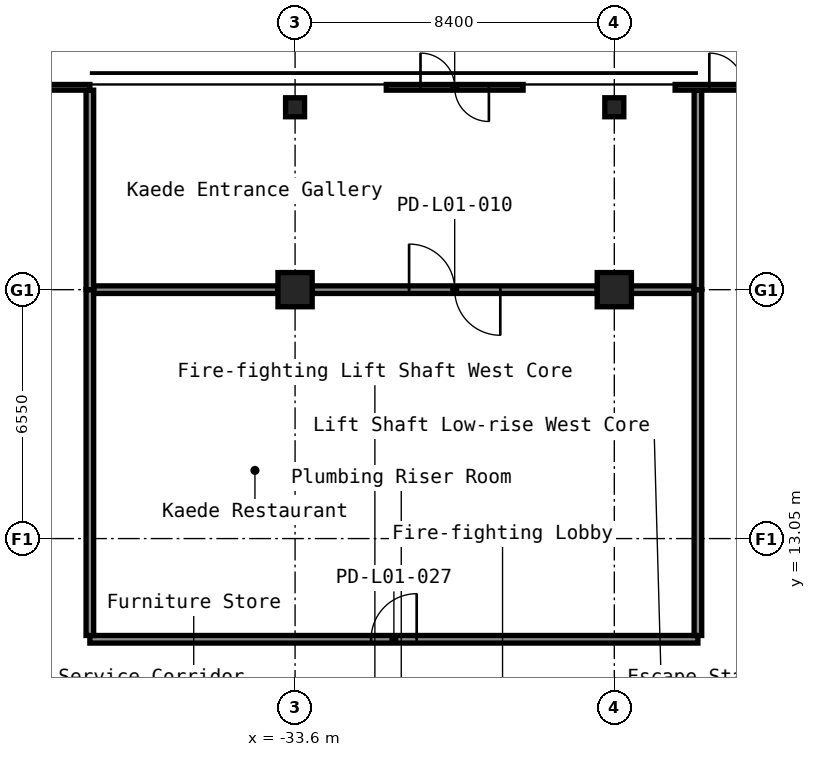
"""IFC4 building model, lengths in metres.
Left out: names, types, materials, properties, quantities, classifications, styles, units other than length and angle.
Written with IfcOpenShell. Run it as: python <this file> out.ifc"""

import sys

from ifc_helpers import new_model, si_unit, direction, frame, frame_2d, origin, origin_2d, place, context, subcontext, project, spatial, rectangle, hollow_rectangle, extrude, element, fill, save


model = new_model("IFC4")
c1 = context("Model", 3, precision=1e-05, world=origin(), true_north=direction((0.0, 1.0)))
c2 = subcontext(c1, "Body", "Model", "MODEL_VIEW")
j1 = project(units=[si_unit("LENGTHUNIT", "METRE"), si_unit("PLANEANGLEUNIT", "RADIAN")], contexts=[c1])
p1 = place(None, origin())
s1 = spatial("IfcSite", under=j1, at=p1, CompositionType="ELEMENT")
p2 = place(p1, origin())
s2 = spatial("IfcBuilding", under=s1, at=p2, CompositionType="ELEMENT")
p3 = place(p2, origin())
s3 = spatial("IfcBuildingStorey", under=s2, at=p3, CompositionType="ELEMENT", Elevation=0.0)
for number, where, z_axis, x_axis in (
    (1, (-33.6, 19.6, -0.3), (0.0, 0.0, 1.0), (1.0, 0.0, 0.0)),
    (2, (-25.2, 19.6, -0.3), (0.0, 0.0, 1.0), (1.0, 0.0, 0.0)),
):
    element("IfcColumn", number, at=place(p3, frame(where, z_axis=z_axis, x_axis=x_axis)), inside=s3, PredefinedType="COLUMN", context=c2, shape_type="SweptSolid", body=[
        extrude(hollow_rectangle(XDim=0.9, YDim=0.9, WallThickness=0.036, at=origin_2d()), origin(), (0.0, 0.0, 1.0), 8.9),
    ])
for number, where, z_axis, x_axis in (
    (3, (-33.6, 24.4, -0.3), (0.0, 0.0, 1.0), (1.0, 0.0, 0.0)),
    (4, (-25.2, 24.4, -0.3), (0.0, 0.0, 1.0), (1.0, 0.0, 0.0)),
):
    element("IfcColumn", number, at=place(p3, frame(where, z_axis=z_axis, x_axis=x_axis)), inside=s3, PredefinedType="COLUMN", context=c2, shape_type="SweptSolid", body=[
        extrude(hollow_rectangle(XDim=0.5, YDim=0.5, WallThickness=0.019, InnerFilletRadius=0.029, OuterFilletRadius=0.048, at=origin_2d()), origin(), (0.0, 0.0, 1.0), 8.9),
    ])
p4 = place(p3, frame((-38.9, 19.6, 0.0), z_axis=(0.0, 0.0, 1.0), x_axis=(1.0, 0.0, 0.0)))
e5 = element("IfcWall", 5, at=p4, inside=s3, PredefinedType="PARTITIONING", context=c2, shape_type="SweptSolid", body=[
    extrude(rectangle(XDim=4.85, YDim=0.2, at=frame_2d((2.425, 0.0))), origin(), (0.0, 0.0, 1.0), 8.6),
])
p5 = place(p3, frame((-33.15, 19.6, 0.0), z_axis=(0.0, 0.0, 1.0), x_axis=(1.0, 0.0, 0.0)))
e6 = element("IfcWall", 6, at=p5, inside=s3, PredefinedType="PARTITIONING", context=c2, shape_type="SweptSolid", body=[
    extrude(rectangle(XDim=7.5, YDim=0.2, at=frame_2d((3.75, 0.0))), origin(), (0.0, 0.0, 1.0), 8.6),
])
p6 = place(p5, frame((2.55, 0.0, 0.0)))
e7 = element("IfcOpeningElement", 7, at=p6, cuts=e6, PredefinedType="OPENING", context=c2, shape_type="SweptSolid", body=[
    extrude(rectangle(XDim=2.4, YDim=2.1, at=frame_2d((1.2, 1.05))), frame((0.0, 0.11, 0.0), z_axis=(0.0, -1.0, 0.0), x_axis=(1.0, 0.0, 0.0)), (0.0, 0.0, 1.0), 0.22),
])
p7 = place(p3, frame((-24.75, 19.6, 0.0), z_axis=(0.0, 0.0, 1.0), x_axis=(1.0, 0.0, 0.0)))
e8 = element("IfcWall", 8, at=p7, inside=s3, PredefinedType="PARTITIONING", context=c2, shape_type="SweptSolid", body=[
    extrude(rectangle(XDim=1.65, YDim=0.2, at=frame_2d((0.825, 0.0))), origin(), (0.0, 0.0, 1.0), 8.6),
])
p8 = place(p3, frame((-39.0, 10.4, 0.0), z_axis=(0.0, 0.0, 1.0), x_axis=(1.0, 0.0, 0.0)))
e9 = element("IfcWall", 9, at=p8, inside=s3, PredefinedType="PARTITIONING", context=c2, shape_type="SweptSolid", body=[
    extrude(rectangle(XDim=16.0, YDim=0.2, at=frame_2d((8.0, 0.0))), origin(), (0.0, 0.0, 1.0), 8.6),
])
p9 = place(p8, frame((7.4, 0.0, 0.0)))
e10 = element("IfcOpeningElement", 10, at=p9, cuts=e9, PredefinedType="OPENING", context=c2, shape_type="SweptSolid", body=[
    extrude(rectangle(XDim=1.2, YDim=2.1, at=frame_2d((0.6, 1.05))), frame((0.0, 0.11, 0.0), z_axis=(0.0, -1.0, 0.0), x_axis=(1.0, 0.0, 0.0)), (0.0, 0.0, 1.0), 0.22),
])
for number, where, z_axis, x_axis in (
    (11, (-39.0, 19.6, 0.0), (0.0, 0.0, 1.0), (0.0, -1.0, 0.0)),
    (12, (-23.0, 10.5, 0.0), (0.0, 0.0, 1.0), (0.0, 1.0, 0.0)),
):
    element("IfcWall", number, at=place(p3, frame(where, z_axis=z_axis, x_axis=x_axis)), inside=s3, PredefinedType="PARTITIONING", context=c2, shape_type="SweptSolid", body=[
        extrude(rectangle(XDim=9.1, YDim=0.2, at=frame_2d((4.55, 0.0))), origin(), (0.0, 0.0, 1.0), 8.6),
    ])
for number, where, z_axis, x_axis in (
    (13, (-39.0, 24.85, 0.0), (0.0, 0.0, 1.0), (0.0, -1.0, 0.0)),
    (14, (-23.0, 19.6, 0.0), (0.0, 0.0, 1.0), (0.0, 1.0, 0.0)),
):
    element("IfcWall", number, at=place(p3, frame(where, z_axis=z_axis, x_axis=x_axis)), inside=s3, PredefinedType="PARTITIONING", context=c2, shape_type="SweptSolid", body=[
        extrude(rectangle(XDim=5.25, YDim=0.2, at=frame_2d((2.625, 0.0))), origin(), (0.0, 0.0, 1.0), 8.6),
    ])
p10 = place(p3, frame((-51.98, 24.925, 0.0), z_axis=(0.0, 0.0, 1.0), x_axis=(1.0, 0.0, 0.0)))
e15 = element("IfcWall", 15, at=p10, inside=s3, PredefinedType="STANDARD", context=c2, shape_type="SweptSolid", body=[
    extrude(rectangle(XDim=12.98, YDim=0.15, at=frame_2d((6.49, 0.0))), origin(), (0.0, 0.0, 1.0), 8.6),
])
p11 = place(p10, frame((8.28, 0.0, 0.0)))
e16 = element("IfcOpeningElement", 16, at=p11, cuts=e15, PredefinedType="OPENING", context=c2, shape_type="SweptSolid", body=[
    extrude(rectangle(XDim=1.4, YDim=2.1, at=frame_2d((0.7, 1.05))), frame((0.0, 0.085, 0.0), z_axis=(0.0, -1.0, 0.0), x_axis=(1.0, 0.0, 0.0)), (0.0, 0.0, 1.0), 0.17),
])
p12 = place(p3, frame((-31.2, 24.925, 0.0), z_axis=(0.0, 0.0, 1.0), x_axis=(1.0, 0.0, 0.0)))
e17 = element("IfcWall", 17, at=p12, inside=s3, PredefinedType="STANDARD", context=c2, shape_type="SweptSolid", body=[
    extrude(rectangle(XDim=3.6, YDim=0.15, at=frame_2d((1.8, 0.0))), origin(), (0.0, 0.0, 1.0), 8.6),
])
p13 = place(p12, frame((0.9, 0.0, 0.0)))
e18 = element("IfcOpeningElement", 18, at=p13, cuts=e17, PredefinedType="OPENING", context=c2, shape_type="SweptSolid", body=[
    extrude(rectangle(XDim=1.8, YDim=2.1, at=frame_2d((0.9, 1.05))), frame((0.0, 0.085, 0.0), z_axis=(0.0, -1.0, 0.0), x_axis=(1.0, 0.0, 0.0)), (0.0, 0.0, 1.0), 0.17),
])
p14 = place(p3, frame((-23.6, 24.925, 0.0), z_axis=(0.0, 0.0, 1.0), x_axis=(1.0, 0.0, 0.0)))
e19 = element("IfcWall", 19, at=p14, inside=s3, PredefinedType="STANDARD", context=c2, shape_type="SweptSolid", body=[
    extrude(rectangle(XDim=15.2, YDim=0.15, at=frame_2d((7.6, 0.0))), origin(), (0.0, 0.0, 1.0), 8.6),
])
p15 = place(p14, frame((0.9, 0.0, 0.0)))
e20 = element("IfcOpeningElement", 20, at=p15, cuts=e19, PredefinedType="OPENING", context=c2, shape_type="SweptSolid", body=[
    extrude(rectangle(XDim=1.8, YDim=2.1, at=frame_2d((0.9, 1.05))), frame((0.0, 0.085, 0.0), z_axis=(0.0, -1.0, 0.0), x_axis=(1.0, 0.0, 0.0)), (0.0, 0.0, 1.0), 0.17),
])
p16 = place(p6, origin())
e21 = element("IfcDoor", 21, at=p16, inside=s3, OperationType="DOUBLE_DOOR_DOUBLE_SWING", PredefinedType="DOOR", context=c2, shape_type="SweptSolid", body=[
    extrude(rectangle(XDim=2.4, YDim=2.1, at=frame_2d((1.2, 1.05))), frame((0.0, 0.025, 0.0), z_axis=(0.0, -1.0, 0.0), x_axis=(1.0, 0.0, 0.0)), (0.0, 0.0, 1.0), 0.05),
])
fill(e7, e21)
p17 = place(p9, origin())
e22 = element("IfcDoor", 22, at=p17, inside=s3, OperationType="SINGLE_SWING_LEFT", PredefinedType="DOOR", context=c2, shape_type="SweptSolid", body=[
    extrude(rectangle(XDim=1.2, YDim=2.1, at=frame_2d((0.6, 1.05))), frame((0.0, 0.025, 0.0), z_axis=(0.0, -1.0, 0.0), x_axis=(1.0, 0.0, 0.0)), (0.0, 0.0, 1.0), 0.05),
])
fill(e10, e22)
p18 = place(p13, origin())
e23 = element("IfcDoor", 23, at=p18, inside=s3, OperationType="DOUBLE_DOOR_DOUBLE_SWING", PredefinedType="DOOR", context=c2, shape_type="SweptSolid", body=[
    extrude(rectangle(XDim=1.8, YDim=2.1, at=frame_2d((0.9, 1.05))), frame((0.0, 0.025, 0.0), z_axis=(0.0, -1.0, 0.0), x_axis=(1.0, 0.0, 0.0)), (0.0, 0.0, 1.0), 0.05),
])
fill(e18, e23)
p19 = place(p15, origin())
e24 = element("IfcDoor", 24, at=p19, inside=s3, OperationType="DOUBLE_DOOR_SINGLE_SWING", PredefinedType="DOOR", context=c2, shape_type="SweptSolid", body=[
    extrude(rectangle(XDim=1.8, YDim=2.1, at=frame_2d((0.9, 1.05))), frame((0.0, 0.025, 0.0), z_axis=(0.0, -1.0, 0.0), x_axis=(1.0, 0.0, 0.0)), (0.0, 0.0, 1.0), 0.05),
])
fill(e20, e24)
save(model, sys.argv[1])
